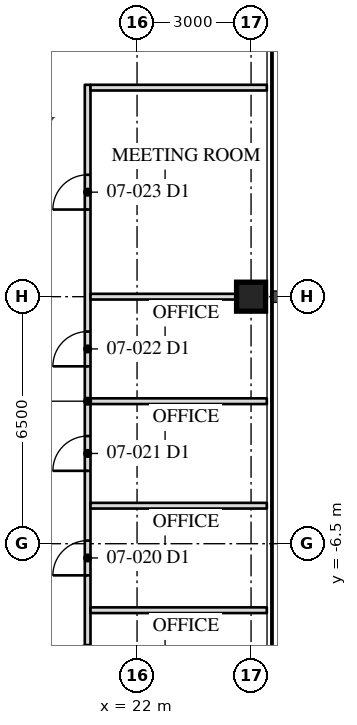
"""IFC4 building model, lengths in metres.
Left out: names, types, materials, properties, quantities, classifications, styles, units other than length and angle.
Written with IfcOpenShell. Run it as: python <this file> out.ifc"""

import sys

from ifc_helpers import new_model, si_unit, direction, frame, frame_2d, origin, origin_2d, place, context, subcontext, project, spatial, rectangle, hollow_rectangle, extrude, element, fill, save


model = new_model("IFC4")
c1 = context("Model", 3, precision=1e-05, world=origin(), true_north=direction((0.0, 1.0)))
c2 = subcontext(c1, "Body", "Model", "MODEL_VIEW")
j1 = project(units=[si_unit("LENGTHUNIT", "METRE"), si_unit("PLANEANGLEUNIT", "RADIAN")], contexts=[c1])
p1 = place(None, origin())
s1 = spatial("IfcSite", under=j1, at=p1, CompositionType="ELEMENT")
p2 = place(p1, origin())
s2 = spatial("IfcBuilding", under=s1, at=p2, CompositionType="ELEMENT")
p3 = place(p2, frame((0.0, 0.0, 32.4)))
s3 = spatial("IfcBuildingStorey", under=s2, at=p3, CompositionType="ELEMENT", Elevation=32.4)
p4 = place(p3, frame((25.0, 0.0, 0.0), z_axis=(0.0, 0.0, 1.0), x_axis=(0.0, 1.0, 0.0)))
e1 = element("IfcColumn", 1, at=p4, inside=s3, PredefinedType="COLUMN", context=c2, shape_type="SweptSolid", body=[
    extrude(hollow_rectangle(XDim=0.762, YDim=0.762, WallThickness=0.127, at=origin_2d()), origin(), (0.0, 0.0, 1.0), 4.1),
])
p5 = place(p3, frame((20.7, -11.075, 0.0), z_axis=(0.0, 0.0, 1.0), x_axis=(0.0, 1.0, 0.0)))
e2 = element("IfcWall", 2, at=p5, inside=s3, PredefinedType="PARTITIONING", context=c2, shape_type="SweptSolid", body=[
    extrude(rectangle(XDim=16.65, YDim=0.15, at=frame_2d((8.325, 0.0))), origin(), (0.0, 0.0, 1.0), 3.91),
])
p6 = place(p5, frame((0.992, 0.0, 0.0)))
e3 = element("IfcOpeningElement", 3, at=p6, cuts=e2, PredefinedType="OPENING", context=c2, shape_type="SweptSolid", body=[
    extrude(rectangle(XDim=0.915, YDim=2.134, at=frame_2d((0.458, 1.067))), frame((0.0, 0.085, 0.0), z_axis=(0.0, -1.0, 0.0), x_axis=(1.0, 0.0, 0.0)), (0.0, 0.0, 1.0), 0.17),
])
p7 = place(p5, frame((3.742, 0.0, 0.0)))
e4 = element("IfcOpeningElement", 4, at=p7, cuts=e2, PredefinedType="OPENING", context=c2, shape_type="SweptSolid", body=[
    extrude(rectangle(XDim=0.915, YDim=2.134, at=frame_2d((0.458, 1.067))), frame((0.0, 0.085, 0.0), z_axis=(0.0, -1.0, 0.0), x_axis=(1.0, 0.0, 0.0)), (0.0, 0.0, 1.0), 0.17),
])
p8 = place(p5, frame((6.492, 0.0, 0.0)))
e5 = element("IfcOpeningElement", 5, at=p8, cuts=e2, PredefinedType="OPENING", context=c2, shape_type="SweptSolid", body=[
    extrude(rectangle(XDim=0.915, YDim=2.134, at=frame_2d((0.458, 1.067))), frame((0.0, 0.085, 0.0), z_axis=(0.0, -1.0, 0.0), x_axis=(1.0, 0.0, 0.0)), (0.0, 0.0, 1.0), 0.17),
])
p9 = place(p5, frame((9.242, 0.0, 0.0)))
e6 = element("IfcOpeningElement", 6, at=p9, cuts=e2, PredefinedType="OPENING", context=c2, shape_type="SweptSolid", body=[
    extrude(rectangle(XDim=0.915, YDim=2.134, at=frame_2d((0.458, 1.067))), frame((0.0, 0.085, 0.0), z_axis=(0.0, -1.0, 0.0), x_axis=(1.0, 0.0, 0.0)), (0.0, 0.0, 1.0), 0.17),
])
p10 = place(p5, frame((13.367, 0.0, 0.0)))
e7 = element("IfcOpeningElement", 7, at=p10, cuts=e2, PredefinedType="OPENING", context=c2, shape_type="SweptSolid", body=[
    extrude(rectangle(XDim=0.915, YDim=2.134, at=frame_2d((0.458, 1.067))), frame((0.0, 0.085, 0.0), z_axis=(0.0, -1.0, 0.0), x_axis=(1.0, 0.0, 0.0)), (0.0, 0.0, 1.0), 0.17),
])
for number, where, z_axis, x_axis in (
    (8, (20.775, -8.25, 0.0), (0.0, 0.0, 1.0), (1.0, 0.0, 0.0)),
    (9, (20.775, -5.5, 0.0), (0.0, 0.0, 1.0), (1.0, 0.0, 0.0)),
    (10, (20.775, -2.75, 0.0), (0.0, 0.0, 1.0), (1.0, 0.0, 0.0)),
):
    element("IfcWall", number, at=place(p3, frame(where, z_axis=z_axis, x_axis=x_axis)), inside=s3, PredefinedType="PARTITIONING", context=c2, shape_type="SweptSolid", body=[
        extrude(rectangle(XDim=4.64, YDim=0.15, at=frame_2d((2.32, 0.0))), origin(), (0.0, 0.0, 1.0), 3.91),
    ])
p11 = place(p3, frame((20.775, 0.0, 0.0), z_axis=(0.0, 0.0, 1.0), x_axis=(1.0, 0.0, 0.0)))
e11 = element("IfcWall", 11, at=p11, inside=s3, PredefinedType="PARTITIONING", context=c2, shape_type="SweptSolid", body=[
    extrude(rectangle(XDim=4.64, YDim=0.15, at=frame_2d((2.32, 0.0))), origin(), (0.0, 0.0, 1.0), 3.13),
])
p12 = place(p3, frame((20.775, 5.5, 0.0), z_axis=(0.0, 0.0, 1.0), x_axis=(1.0, 0.0, 0.0)))
e12 = element("IfcWall", 12, at=p12, inside=s3, PredefinedType="PARTITIONING", context=c2, shape_type="SweptSolid", body=[
    extrude(rectangle(XDim=4.64, YDim=0.15, at=frame_2d((2.32, 0.0))), origin(), (0.0, 0.0, 1.0), 3.91),
])
p13 = place(p6, origin())
e13 = element("IfcDoor", 13, at=p13, inside=s3, OperationType="SINGLE_SWING_LEFT", PredefinedType="DOOR", context=c2, shape_type="SweptSolid", body=[
    extrude(rectangle(XDim=0.915, YDim=2.134, at=frame_2d((0.458, 1.067))), frame((0.0, 0.025, 0.0), z_axis=(0.0, -1.0, 0.0), x_axis=(1.0, 0.0, 0.0)), (0.0, 0.0, 1.0), 0.05),
])
fill(e3, e13)
p14 = place(p7, origin())
e14 = element("IfcDoor", 14, at=p14, inside=s3, OperationType="SINGLE_SWING_LEFT", PredefinedType="DOOR", context=c2, shape_type="SweptSolid", body=[
    extrude(rectangle(XDim=0.915, YDim=2.134, at=frame_2d((0.458, 1.067))), frame((0.0, 0.025, 0.0), z_axis=(0.0, -1.0, 0.0), x_axis=(1.0, 0.0, 0.0)), (0.0, 0.0, 1.0), 0.05),
])
fill(e4, e14)
p15 = place(p8, origin())
e15 = element("IfcDoor", 15, at=p15, inside=s3, OperationType="SINGLE_SWING_LEFT", PredefinedType="DOOR", context=c2, shape_type="SweptSolid", body=[
    extrude(rectangle(XDim=0.915, YDim=2.134, at=frame_2d((0.458, 1.067))), frame((0.0, 0.025, 0.0), z_axis=(0.0, -1.0, 0.0), x_axis=(1.0, 0.0, 0.0)), (0.0, 0.0, 1.0), 0.05),
])
fill(e5, e15)
p16 = place(p9, origin())
e16 = element("IfcDoor", 16, at=p16, inside=s3, OperationType="SINGLE_SWING_LEFT", PredefinedType="DOOR", context=c2, shape_type="SweptSolid", body=[
    extrude(rectangle(XDim=0.915, YDim=2.134, at=frame_2d((0.458, 1.067))), frame((0.0, 0.025, 0.0), z_axis=(0.0, -1.0, 0.0), x_axis=(1.0, 0.0, 0.0)), (0.0, 0.0, 1.0), 0.05),
])
fill(e6, e16)
p17 = place(p10, origin())
e17 = element("IfcDoor", 17, at=p17, inside=s3, OperationType="SINGLE_SWING_LEFT", PredefinedType="DOOR", context=c2, shape_type="SweptSolid", body=[
    extrude(rectangle(XDim=0.915, YDim=2.134, at=frame_2d((0.458, 1.067))), frame((0.0, 0.025, 0.0), z_axis=(0.0, -1.0, 0.0), x_axis=(1.0, 0.0, 0.0)), (0.0, 0.0, 1.0), 0.05),
])
fill(e7, e17)
save(model, sys.argv[1])
